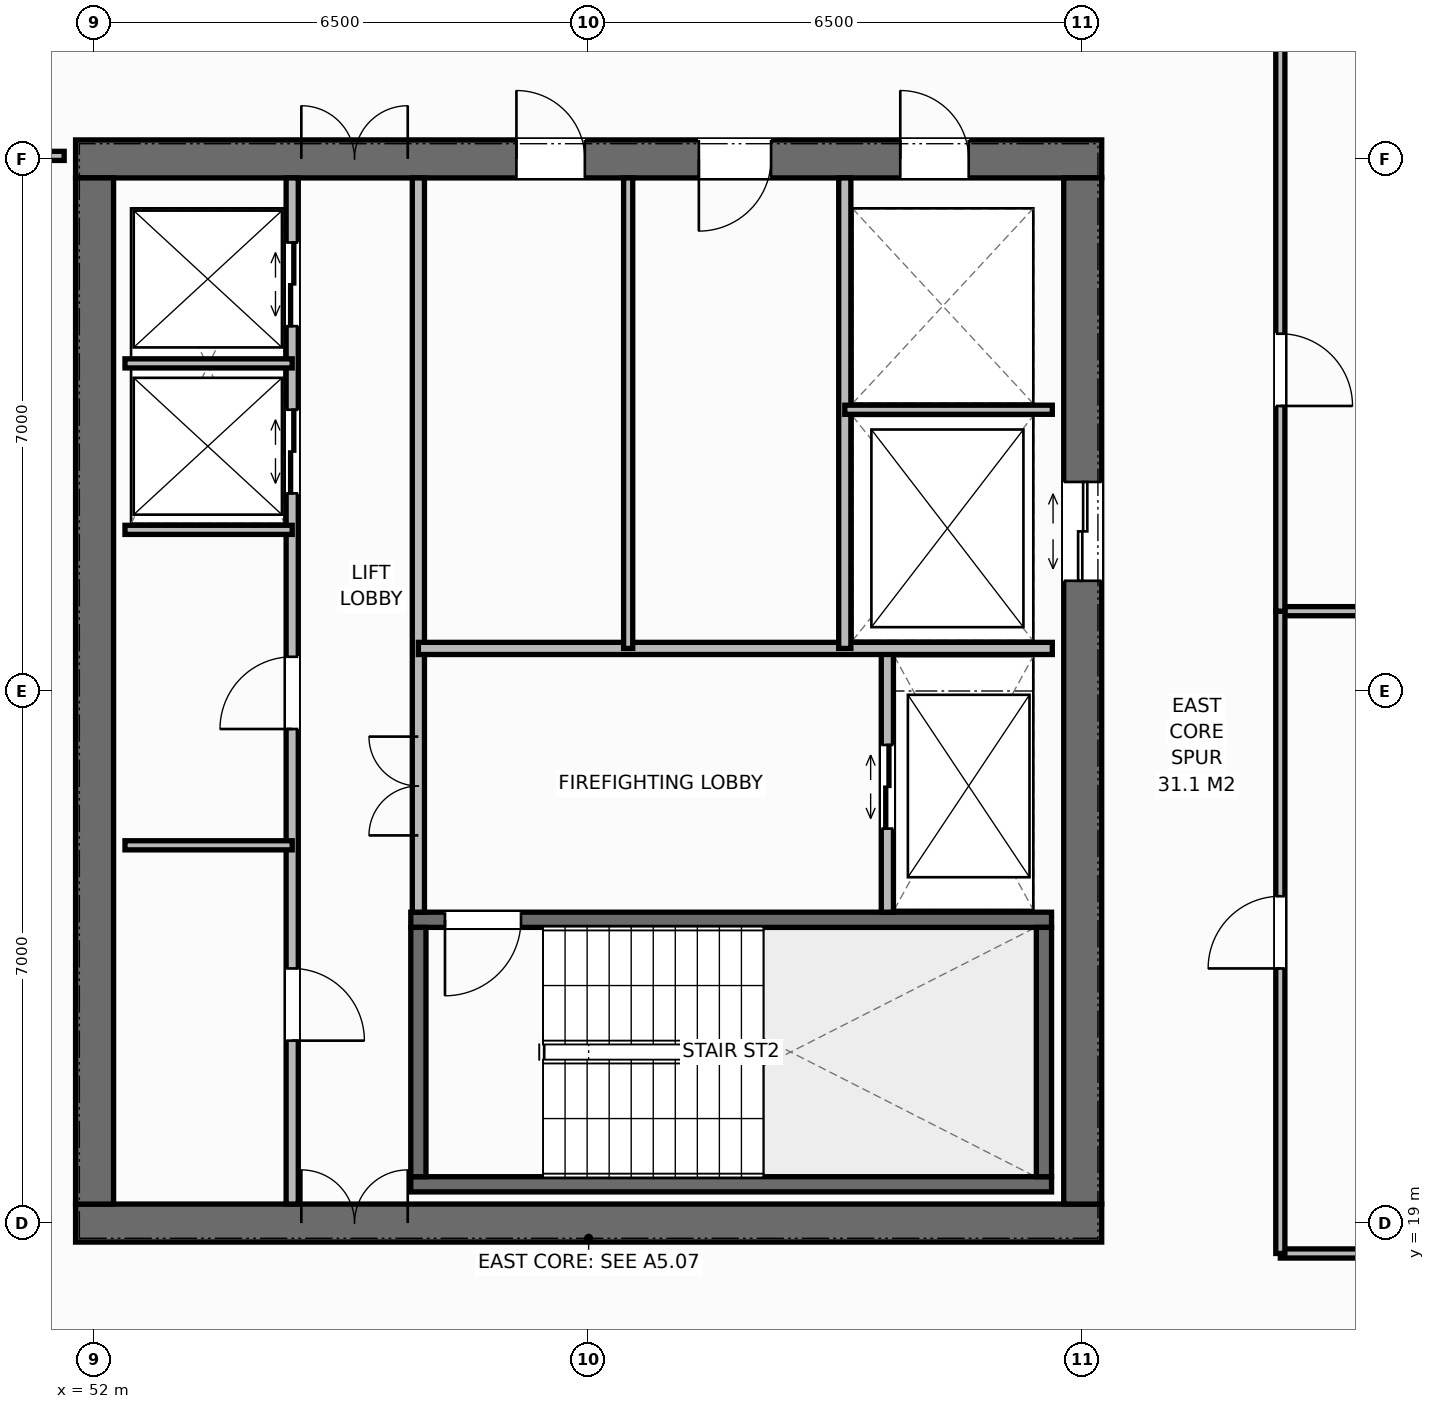
"""IFC4 building model, lengths in metres.
Left out: names, types, materials, properties, quantities, classifications, styles, units other than length and angle.
Written with IfcOpenShell. Run it as: python <this file> out.ifc"""

import sys

from ifc_helpers import new_model, si_unit, direction, frame, frame_2d, origin, place, context, subcontext, project, spatial, rectangle, extrude, element, fill, save


model = new_model("IFC4")
c1 = context("Model", 3, precision=1e-05, world=origin(), true_north=direction((0.0, 1.0)))
c2 = subcontext(c1, "Body", "Model", "MODEL_VIEW")
j1 = project(units=[si_unit("LENGTHUNIT", "METRE"), si_unit("PLANEANGLEUNIT", "RADIAN")], contexts=[c1])
p1 = place(None, origin())
s1 = spatial("IfcSite", under=j1, at=p1, CompositionType="ELEMENT")
p2 = place(p1, origin())
s2 = spatial("IfcBuilding", under=s1, at=p2, CompositionType="ELEMENT")
p3 = place(p2, frame((0.0, 0.0, 270.8)))
s3 = spatial("IfcBuildingStorey", under=s2, at=p3, CompositionType="ELEMENT", Elevation=270.8)
p4 = place(p3, frame((51.75, 19.0, 0.0), z_axis=(0.0, 0.0, 1.0), x_axis=(1.0, 0.0, 0.0)))
e1 = element("IfcWall", 1, at=p4, inside=s3, PredefinedType="SHEAR", context=c2, shape_type="SweptSolid", body=[
    extrude(rectangle(XDim=13.5, YDim=0.5, at=frame_2d((6.75, 0.0))), origin(), (0.0, 0.0, 1.0), 3.8),
])
p5 = place(p4, frame((2.97, 0.0, 0.0)))
e2 = element("IfcOpeningElement", 2, at=p5, cuts=e1, PredefinedType="OPENING", context=c2, shape_type="SweptSolid", body=[
    extrude(rectangle(XDim=1.4, YDim=2.2, at=frame_2d((0.7, 1.1))), frame((0.0, 0.26, 0.0), z_axis=(0.0, -1.0, 0.0), x_axis=(1.0, 0.0, 0.0)), (0.0, 0.0, 1.0), 0.52),
])
p6 = place(p3, frame((51.75, 33.0, 0.0), z_axis=(0.0, 0.0, 1.0), x_axis=(1.0, 0.0, 0.0)))
e3 = element("IfcWall", 3, at=p6, inside=s3, PredefinedType="SHEAR", context=c2, shape_type="SweptSolid", body=[
    extrude(rectangle(XDim=13.5, YDim=0.5, at=frame_2d((6.75, 0.0))), origin(), (0.0, 0.0, 1.0), 3.8),
])
p7 = place(p6, frame((2.97, 0.0, 0.0)))
e4 = element("IfcOpeningElement", 4, at=p7, cuts=e3, PredefinedType="OPENING", context=c2, shape_type="SweptSolid", body=[
    extrude(rectangle(XDim=1.4, YDim=2.2, at=frame_2d((0.7, 1.1))), frame((0.0, 0.26, 0.0), z_axis=(0.0, -1.0, 0.0), x_axis=(1.0, 0.0, 0.0)), (0.0, 0.0, 1.0), 0.52),
])
p8 = place(p6, frame((10.85, 0.0, 0.0)))
e5 = element("IfcOpeningElement", 5, at=p8, cuts=e3, PredefinedType="OPENING", context=c2, shape_type="SweptSolid", body=[
    extrude(rectangle(XDim=0.9, YDim=2.15, at=frame_2d((0.45, 1.075))), frame((0.0, 0.26, 0.0), z_axis=(0.0, -1.0, 0.0), x_axis=(1.0, 0.0, 0.0)), (0.0, 0.0, 1.0), 0.52),
])
p9 = place(p6, frame((5.8, 0.0, 0.0)))
e6 = element("IfcOpeningElement", 6, at=p9, cuts=e3, PredefinedType="OPENING", context=c2, shape_type="SweptSolid", body=[
    extrude(rectangle(XDim=0.9, YDim=2.15, at=frame_2d((0.45, 1.075))), frame((0.0, 0.26, 0.0), z_axis=(0.0, -1.0, 0.0), x_axis=(1.0, 0.0, 0.0)), (0.0, 0.0, 1.0), 0.52),
])
p10 = place(p6, frame((8.2, 0.0, 0.0)))
e7 = element("IfcOpeningElement", 7, at=p10, cuts=e3, PredefinedType="OPENING", context=c2, shape_type="SweptSolid", body=[
    extrude(rectangle(XDim=0.95, YDim=2.15, at=frame_2d((0.475, 1.075))), frame((0.0, 0.26, 0.0), z_axis=(0.0, -1.0, 0.0), x_axis=(1.0, 0.0, 0.0)), (0.0, 0.0, 1.0), 0.52),
])
p11 = place(p3, frame((52.0, 19.25, 0.0), z_axis=(0.0, 0.0, 1.0), x_axis=(0.0, 1.0, 0.0)))
e8 = element("IfcWall", 8, at=p11, inside=s3, PredefinedType="SHEAR", context=c2, shape_type="SweptSolid", body=[
    extrude(rectangle(XDim=13.5, YDim=0.5, at=frame_2d((6.75, 0.0))), origin(), (0.0, 0.0, 1.0), 3.8),
])
p12 = place(p3, frame((65.0, 19.25, 0.0), z_axis=(0.0, 0.0, 1.0), x_axis=(0.0, 1.0, 0.0)))
e9 = element("IfcWall", 9, at=p12, inside=s3, PredefinedType="SHEAR", context=c2, shape_type="SweptSolid", body=[
    extrude(rectangle(XDim=13.5, YDim=0.5, at=frame_2d((6.75, 0.0))), origin(), (0.0, 0.0, 1.0), 3.8),
])
p13 = place(p12, frame((8.2, 0.0, 0.0)))
e10 = element("IfcOpeningElement", 10, at=p13, cuts=e9, PredefinedType="OPENING", context=c2, shape_type="SweptSolid", body=[
    extrude(rectangle(XDim=1.3, YDim=2.2, at=frame_2d((0.65, 1.1))), frame((0.0, 0.26, 0.0), z_axis=(0.0, -1.0, 0.0), x_axis=(1.0, 0.0, 0.0)), (0.0, 0.0, 1.0), 0.52),
])
p14 = place(p3, frame((56.16, 19.51, 0.0), z_axis=(0.0, 0.0, 1.0), x_axis=(1.0, 0.0, 0.0)))
e11 = element("IfcWall", 11, at=p14, inside=s3, PredefinedType="SHEAR", context=c2, shape_type="SweptSolid", body=[
    extrude(rectangle(XDim=8.43, YDim=0.2, at=frame_2d((4.215, 0.0))), origin(), (0.0, 0.0, 1.0), 3.8),
])
p15 = place(p3, frame((56.16, 22.99, 0.0), z_axis=(0.0, 0.0, 1.0), x_axis=(1.0, 0.0, 0.0)))
e12 = element("IfcWall", 12, at=p15, inside=s3, PredefinedType="SHEAR", context=c2, shape_type="SweptSolid", body=[
    extrude(rectangle(XDim=8.43, YDim=0.2, at=frame_2d((4.215, 0.0))), origin(), (0.0, 0.0, 1.0), 3.8),
])
p16 = place(p15, frame((0.45, 0.0, 0.0)))
e13 = element("IfcOpeningElement", 13, at=p16, cuts=e12, PredefinedType="OPENING", context=c2, shape_type="SweptSolid", body=[
    extrude(rectangle(XDim=1.0, YDim=2.15, at=frame_2d((0.5, 1.075))), frame((0.0, 0.11, 0.0), z_axis=(0.0, -1.0, 0.0), x_axis=(1.0, 0.0, 0.0)), (0.0, 0.0, 1.0), 0.22),
])
for number, where, z_axis, x_axis in (
    (14, (56.26, 19.61, 0.0), (0.0, 0.0, 1.0), (0.0, 1.0, 0.0)),
    (15, (64.49, 19.61, 0.0), (0.0, 0.0, 1.0), (0.0, 1.0, 0.0)),
):
    element("IfcWall", number, at=place(p3, frame(where, z_axis=z_axis, x_axis=x_axis)), inside=s3, PredefinedType="SHEAR", context=c2, shape_type="SweptSolid", body=[
        extrude(rectangle(XDim=3.28, YDim=0.2, at=frame_2d((1.64, 0.0))), origin(), (0.0, 0.0, 1.0), 3.8),
    ])
p17 = place(p3, frame((54.6, 19.25, 0.0), z_axis=(0.0, 0.0, 1.0), x_axis=(0.0, 1.0, 0.0)))
e16 = element("IfcWall", 16, at=p17, inside=s3, PredefinedType="STANDARD", context=c2, shape_type="SweptSolid", body=[
    extrude(rectangle(XDim=13.5, YDim=0.16, at=frame_2d((6.75, 0.0))), origin(), (0.0, 0.0, 1.0), 3.588),
])
p18 = place(p17, frame((2.15, 0.0, 0.0)))
e17 = element("IfcOpeningElement", 17, at=p18, cuts=e16, PredefinedType="OPENING", context=c2, shape_type="SweptSolid", body=[
    extrude(rectangle(XDim=0.95, YDim=2.15, at=frame_2d((0.475, 1.075))), frame((0.0, 0.09, 0.0), z_axis=(0.0, -1.0, 0.0), x_axis=(1.0, 0.0, 0.0)), (0.0, 0.0, 1.0), 0.18),
])
p19 = place(p17, frame((6.25, 0.0, 0.0)))
e18 = element("IfcOpeningElement", 18, at=p19, cuts=e16, PredefinedType="OPENING", context=c2, shape_type="SweptSolid", body=[
    extrude(rectangle(XDim=0.95, YDim=2.15, at=frame_2d((0.475, 1.075))), frame((0.0, 0.09, 0.0), z_axis=(0.0, -1.0, 0.0), x_axis=(1.0, 0.0, 0.0)), (0.0, 0.0, 1.0), 0.18),
])
p20 = place(p17, frame((9.35, 0.0, 0.0)))
e19 = element("IfcOpeningElement", 19, at=p20, cuts=e16, PredefinedType="OPENING", context=c2, shape_type="SweptSolid", body=[
    extrude(rectangle(XDim=1.1, YDim=2.2, at=frame_2d((0.55, 1.1))), frame((0.0, 0.09, 0.0), z_axis=(0.0, -1.0, 0.0), x_axis=(1.0, 0.0, 0.0)), (0.0, 0.0, 1.0), 0.18),
])
p21 = place(p17, frame((11.55, 0.0, 0.0)))
e20 = element("IfcOpeningElement", 20, at=p21, cuts=e16, PredefinedType="OPENING", context=c2, shape_type="SweptSolid", body=[
    extrude(rectangle(XDim=1.1, YDim=2.2, at=frame_2d((0.55, 1.1))), frame((0.0, 0.09, 0.0), z_axis=(0.0, -1.0, 0.0), x_axis=(1.0, 0.0, 0.0)), (0.0, 0.0, 1.0), 0.18),
])
p22 = place(p3, frame((56.26, 23.09, 0.0), z_axis=(0.0, 0.0, 1.0), x_axis=(0.0, 1.0, 0.0)))
e21 = element("IfcWall", 21, at=p22, inside=s3, PredefinedType="STANDARD", context=c2, shape_type="SweptSolid", body=[
    extrude(rectangle(XDim=9.66, YDim=0.16, at=frame_2d((4.83, 0.0))), origin(), (0.0, 0.0, 1.0), 3.588),
])
p23 = place(p22, frame((1.01, 0.0, 0.0)))
e22 = element("IfcOpeningElement", 22, at=p23, cuts=e21, PredefinedType="OPENING", context=c2, shape_type="SweptSolid", body=[
    extrude(rectangle(XDim=1.3, YDim=2.2, at=frame_2d((0.65, 1.1))), frame((0.0, 0.09, 0.0), z_axis=(0.0, -1.0, 0.0), x_axis=(1.0, 0.0, 0.0)), (0.0, 0.0, 1.0), 0.18),
])
for number, where, z_axis, x_axis in (
    (23, (52.4, 23.97, 0.0), (0.0, 0.0, 1.0), (1.0, 0.0, 0.0)),
    (24, (52.4, 28.12, 0.0), (0.0, 0.0, 1.0), (1.0, 0.0, 0.0)),
    (25, (52.4, 30.31, 0.0), (0.0, 0.0, 1.0), (1.0, 0.0, 0.0)),
):
    element("IfcWall", number, at=place(p3, frame(where, z_axis=z_axis, x_axis=x_axis)), inside=s3, PredefinedType="PARTITIONING", context=c2, shape_type="SweptSolid", body=[
        extrude(rectangle(XDim=2.2, YDim=0.12, at=frame_2d((1.1, 0.0))), origin(), (0.0, 0.0, 1.0), 3.588),
    ])
p24 = place(p3, frame((62.43, 23.09, 0.0), z_axis=(0.0, 0.0, 1.0), x_axis=(0.0, 1.0, 0.0)))
e26 = element("IfcWall", 26, at=p24, inside=s3, PredefinedType="STANDARD", context=c2, shape_type="SweptSolid", body=[
    extrude(rectangle(XDim=3.47, YDim=0.16, at=frame_2d((1.735, 0.0))), origin(), (0.0, 0.0, 1.0), 3.588),
])
p25 = place(p24, frame((1.1, 0.0, 0.0)))
e27 = element("IfcOpeningElement", 27, at=p25, cuts=e26, PredefinedType="OPENING", context=c2, shape_type="SweptSolid", body=[
    extrude(rectangle(XDim=1.1, YDim=2.2, at=frame_2d((0.55, 1.1))), frame((0.0, 0.09, 0.0), z_axis=(0.0, -1.0, 0.0), x_axis=(1.0, 0.0, 0.0)), (0.0, 0.0, 1.0), 0.18),
])
p26 = place(p3, frame((56.26, 26.56, 0.0), z_axis=(0.0, 0.0, 1.0), x_axis=(1.0, 0.0, 0.0)))
e28 = element("IfcWall", 28, at=p26, inside=s3, PredefinedType="STANDARD", context=c2, shape_type="SweptSolid", body=[
    extrude(rectangle(XDim=8.34, YDim=0.16, at=frame_2d((4.17, 0.0))), origin(), (0.0, 0.0, 1.0), 3.588),
])
p27 = place(p3, frame((61.87, 26.56, 0.0), z_axis=(0.0, 0.0, 1.0), x_axis=(0.0, 1.0, 0.0)))
e29 = element("IfcWall", 29, at=p27, inside=s3, PredefinedType="STANDARD", context=c2, shape_type="SweptSolid", body=[
    extrude(rectangle(XDim=6.19, YDim=0.16, at=frame_2d((3.095, 0.0))), origin(), (0.0, 0.0, 1.0), 3.588),
])
p28 = place(p3, frame((61.87, 29.7, 0.0), z_axis=(0.0, 0.0, 1.0), x_axis=(1.0, 0.0, 0.0)))
e30 = element("IfcWall", 30, at=p28, inside=s3, PredefinedType="PARTITIONING", context=c2, shape_type="SweptSolid", body=[
    extrude(rectangle(XDim=2.73, YDim=0.12, at=frame_2d((1.365, 0.0))), origin(), (0.0, 0.0, 1.0), 3.588),
])
p29 = place(p3, frame((59.02, 26.56, 0.0), z_axis=(0.0, 0.0, 1.0), x_axis=(0.0, 1.0, 0.0)))
e31 = element("IfcWall", 31, at=p29, inside=s3, PredefinedType="PARTITIONING", context=c2, shape_type="SweptSolid", body=[
    extrude(rectangle(XDim=6.19, YDim=0.12, at=frame_2d((3.095, 0.0))), origin(), (0.0, 0.0, 1.0), 3.588),
])
p30 = place(p3, frame((48.0, 33.04, 0.0), z_axis=(0.0, 0.0, 1.0), x_axis=(1.0, 0.0, 0.0)))
e32 = element("IfcWall", 32, at=p30, inside=s3, PredefinedType="PARTITIONING", context=c2, shape_type="SweptSolid", body=[
    extrude(rectangle(XDim=3.6, YDim=0.12, at=frame_2d((1.8, 0.0))), origin(), (0.0, 0.0, 1.0), 3.328),
])
p31 = place(p30, frame((1.1, 0.0, 0.0)))
e33 = element("IfcOpeningElement", 33, at=p31, cuts=e32, PredefinedType="OPENING", context=c2, shape_type="SweptSolid", body=[
    extrude(rectangle(XDim=0.95, YDim=2.15, at=frame_2d((0.475, 1.075))), frame((0.0, 0.07, 0.0), z_axis=(0.0, -1.0, 0.0), x_axis=(1.0, 0.0, 0.0)), (0.0, 0.0, 1.0), 0.14),
])
for number, where, z_axis, x_axis in (
    (34, (67.6, 18.6, 0.0), (0.0, 0.0, 1.0), (1.0, 0.0, 0.0)),
    (35, (67.6, 27.05, 0.0), (0.0, 0.0, 1.0), (1.0, 0.0, 0.0)),
):
    element("IfcWall", number, at=place(p3, frame(where, z_axis=z_axis, x_axis=x_axis)), inside=s3, PredefinedType="PARTITIONING", context=c2, shape_type="SweptSolid", body=[
        extrude(rectangle(XDim=3.893, YDim=0.12, at=frame_2d((1.946, 0.0))), origin(), (0.0, 0.0, 1.0), 3.588),
    ])
p32 = place(p3, frame((67.6, 18.6, 0.0), z_axis=(0.0, 0.0, 1.0), x_axis=(0.0, 1.0, 0.0)))
e36 = element("IfcWall", 36, at=p32, inside=s3, PredefinedType="PARTITIONING", context=c2, shape_type="SweptSolid", body=[
    extrude(rectangle(XDim=8.45, YDim=0.12, at=frame_2d((4.225, 0.0))), origin(), (0.0, 0.0, 1.0), 3.588),
])
p33 = place(p32, frame((3.75, 0.0, 0.0)))
e37 = element("IfcOpeningElement", 37, at=p33, cuts=e36, PredefinedType="OPENING", context=c2, shape_type="SweptSolid", body=[
    extrude(rectangle(XDim=0.95, YDim=2.15, at=frame_2d((0.475, 1.075))), frame((0.0, 0.07, 0.0), z_axis=(0.0, -1.0, 0.0), x_axis=(1.0, 0.0, 0.0)), (0.0, 0.0, 1.0), 0.14),
])
p34 = place(p3, frame((67.6, 27.05, 0.0), z_axis=(0.0, 0.0, 1.0), x_axis=(0.0, 1.0, 0.0)))
e38 = element("IfcWall", 38, at=p34, inside=s3, PredefinedType="PARTITIONING", context=c2, shape_type="SweptSolid", body=[
    extrude(rectangle(XDim=8.45, YDim=0.12, at=frame_2d((4.225, 0.0))), origin(), (0.0, 0.0, 1.0), 3.588),
])
p35 = place(p34, frame((2.7, 0.0, 0.0)))
e39 = element("IfcOpeningElement", 39, at=p35, cuts=e38, PredefinedType="OPENING", context=c2, shape_type="SweptSolid", body=[
    extrude(rectangle(XDim=0.95, YDim=2.15, at=frame_2d((0.475, 1.075))), frame((0.0, 0.07, 0.0), z_axis=(0.0, -1.0, 0.0), x_axis=(1.0, 0.0, 0.0)), (0.0, 0.0, 1.0), 0.14),
])
p36 = place(p5, origin())
e40 = element("IfcDoor", 40, at=p36, inside=s3, OperationType="DOUBLE_DOOR_SINGLE_SWING", PredefinedType="DOOR", context=c2, shape_type="SweptSolid", body=[
    extrude(rectangle(XDim=1.4, YDim=2.2, at=frame_2d((0.7, 1.1))), frame((0.0, 0.075, 0.0), z_axis=(0.0, -1.0, 0.0), x_axis=(1.0, 0.0, 0.0)), (0.0, 0.0, 1.0), 0.05),
])
fill(e2, e40)
p37 = place(p7, origin())
e41 = element("IfcDoor", 41, at=p37, inside=s3, OperationType="DOUBLE_DOOR_SINGLE_SWING", PredefinedType="DOOR", context=c2, shape_type="SweptSolid", body=[
    extrude(rectangle(XDim=1.4, YDim=2.2, at=frame_2d((0.7, 1.1))), frame((0.0, -0.025, 0.0), z_axis=(0.0, -1.0, 0.0), x_axis=(1.0, 0.0, 0.0)), (0.0, 0.0, 1.0), 0.05),
])
fill(e4, e41)
p38 = place(p18, origin())
e42 = element("IfcDoor", 42, at=p38, inside=s3, OperationType="SINGLE_SWING_RIGHT", PredefinedType="DOOR", context=c2, shape_type="SweptSolid", body=[
    extrude(rectangle(XDim=0.95, YDim=2.15, at=frame_2d((0.475, 1.075))), frame((0.0, 0.025, 0.0), z_axis=(0.0, -1.0, 0.0), x_axis=(1.0, 0.0, 0.0)), (0.0, 0.0, 1.0), 0.05),
])
fill(e17, e42)
p39 = place(p19, origin())
e43 = element("IfcDoor", 43, at=p39, inside=s3, OperationType="SINGLE_SWING_LEFT", PredefinedType="DOOR", context=c2, shape_type="SweptSolid", body=[
    extrude(rectangle(XDim=0.95, YDim=2.15, at=frame_2d((0.475, 1.075))), frame((0.0, 0.025, 0.0), z_axis=(0.0, -1.0, 0.0), x_axis=(1.0, 0.0, 0.0)), (0.0, 0.0, 1.0), 0.05),
])
fill(e18, e43)
p40 = place(p20, origin())
e44 = element("IfcDoor", 44, at=p40, inside=s3, OperationType="DOUBLE_DOOR_SLIDING", PredefinedType="DOOR", context=c2, shape_type="SweptSolid", body=[
    extrude(rectangle(XDim=1.1, YDim=2.2, at=frame_2d((0.55, 1.1))), frame((0.0, 0.025, 0.0), z_axis=(0.0, -1.0, 0.0), x_axis=(1.0, 0.0, 0.0)), (0.0, 0.0, 1.0), 0.05),
])
fill(e19, e44)
p41 = place(p21, origin())
e45 = element("IfcDoor", 45, at=p41, inside=s3, OperationType="DOUBLE_DOOR_SLIDING", PredefinedType="DOOR", context=c2, shape_type="SweptSolid", body=[
    extrude(rectangle(XDim=1.1, YDim=2.2, at=frame_2d((0.55, 1.1))), frame((0.0, 0.025, 0.0), z_axis=(0.0, -1.0, 0.0), x_axis=(1.0, 0.0, 0.0)), (0.0, 0.0, 1.0), 0.05),
])
fill(e20, e45)
p42 = place(p16, origin())
e46 = element("IfcDoor", 46, at=p42, inside=s3, OperationType="SINGLE_SWING_RIGHT", PredefinedType="DOOR", context=c2, shape_type="SweptSolid", body=[
    extrude(rectangle(XDim=1.0, YDim=2.15, at=frame_2d((0.5, 1.075))), frame((0.0, 0.025, 0.0), z_axis=(0.0, -1.0, 0.0), x_axis=(1.0, 0.0, 0.0)), (0.0, 0.0, 1.0), 0.05),
])
fill(e13, e46)
p43 = place(p25, origin())
e47 = element("IfcDoor", 47, at=p43, inside=s3, OperationType="DOUBLE_DOOR_SLIDING", PredefinedType="DOOR", context=c2, shape_type="SweptSolid", body=[
    extrude(rectangle(XDim=1.1, YDim=2.2, at=frame_2d((0.55, 1.1))), frame((0.0, 0.025, 0.0), z_axis=(0.0, -1.0, 0.0), x_axis=(1.0, 0.0, 0.0)), (0.0, 0.0, 1.0), 0.05),
])
fill(e27, e47)
p44 = place(p23, origin())
e48 = element("IfcDoor", 48, at=p44, inside=s3, OperationType="DOUBLE_DOOR_SINGLE_SWING", PredefinedType="DOOR", context=c2, shape_type="SweptSolid", body=[
    extrude(rectangle(XDim=1.3, YDim=2.2, at=frame_2d((0.65, 1.1))), frame((0.0, 0.025, 0.0), z_axis=(0.0, -1.0, 0.0), x_axis=(1.0, 0.0, 0.0)), (0.0, 0.0, 1.0), 0.05),
])
fill(e22, e48)
p45 = place(p13, origin())
e49 = element("IfcDoor", 49, at=p45, inside=s3, OperationType="DOUBLE_DOOR_SLIDING", PredefinedType="DOOR", context=c2, shape_type="SweptSolid", body=[
    extrude(rectangle(XDim=1.3, YDim=2.2, at=frame_2d((0.65, 1.1))), frame((0.0, 0.025, 0.0), z_axis=(0.0, -1.0, 0.0), x_axis=(1.0, 0.0, 0.0)), (0.0, 0.0, 1.0), 0.05),
])
fill(e10, e49)
p46 = place(p8, origin())
e50 = element("IfcDoor", 50, at=p46, inside=s3, OperationType="SINGLE_SWING_LEFT", PredefinedType="DOOR", context=c2, shape_type="SweptSolid", body=[
    extrude(rectangle(XDim=0.9, YDim=2.15, at=frame_2d((0.45, 1.075))), frame((0.0, -0.025, 0.0), z_axis=(0.0, -1.0, 0.0), x_axis=(1.0, 0.0, 0.0)), (0.0, 0.0, 1.0), 0.05),
])
fill(e5, e50)
p47 = place(p9, origin())
e51 = element("IfcDoor", 51, at=p47, inside=s3, OperationType="SINGLE_SWING_LEFT", PredefinedType="DOOR", context=c2, shape_type="SweptSolid", body=[
    extrude(rectangle(XDim=0.9, YDim=2.15, at=frame_2d((0.45, 1.075))), frame((0.0, -0.025, 0.0), z_axis=(0.0, -1.0, 0.0), x_axis=(1.0, 0.0, 0.0)), (0.0, 0.0, 1.0), 0.05),
])
fill(e6, e51)
p48 = place(p10, origin())
e52 = element("IfcDoor", 52, at=p48, inside=s3, OperationType="SINGLE_SWING_RIGHT", PredefinedType="DOOR", context=c2, shape_type="SweptSolid", body=[
    extrude(rectangle(XDim=0.95, YDim=2.15, at=frame_2d((0.475, 1.075))), frame((0.0, -0.025, 0.0), z_axis=(0.0, -1.0, 0.0), x_axis=(1.0, 0.0, 0.0)), (0.0, 0.0, 1.0), 0.05),
])
fill(e7, e52)
p49 = place(p33, origin())
e53 = element("IfcDoor", 53, at=p49, inside=s3, OperationType="SINGLE_SWING_LEFT", PredefinedType="DOOR", context=c2, shape_type="SweptSolid", body=[
    extrude(rectangle(XDim=0.95, YDim=2.15, at=frame_2d((0.475, 1.075))), frame((0.0, 0.025, 0.0), z_axis=(0.0, -1.0, 0.0), x_axis=(1.0, 0.0, 0.0)), (0.0, 0.0, 1.0), 0.05),
])
fill(e37, e53)
p50 = place(p35, origin())
e54 = element("IfcDoor", 54, at=p50, inside=s3, OperationType="SINGLE_SWING_RIGHT", PredefinedType="DOOR", context=c2, shape_type="SweptSolid", body=[
    extrude(rectangle(XDim=0.95, YDim=2.15, at=frame_2d((0.475, 1.075))), frame((0.0, 0.025, 0.0), z_axis=(0.0, -1.0, 0.0), x_axis=(1.0, 0.0, 0.0)), (0.0, 0.0, 1.0), 0.05),
])
fill(e39, e54)
save(model, sys.argv[1])
